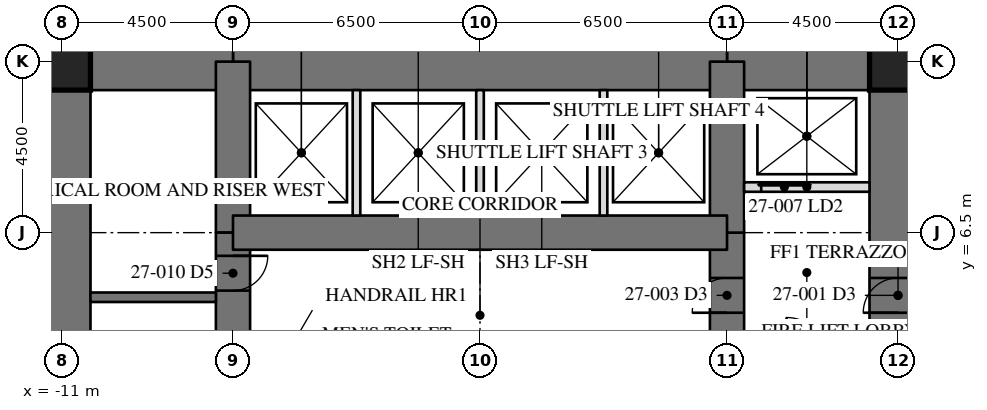
"""IFC4 building model, lengths in metres.
Left out: names, types, materials, properties, quantities, classifications, styles, units other than length and angle.
Written with IfcOpenShell. Run it as: python <this file> out.ifc"""

import sys

from ifc_helpers import new_model, si_unit, direction, frame, frame_2d, origin, origin_2d, place, context, subcontext, project, spatial, rectangle, hollow_rectangle, extrude, element, fill, save


model = new_model("IFC4")
c1 = context("Model", 3, precision=1e-05, world=origin(), true_north=direction((0.0, 1.0)))
c2 = subcontext(c1, "Body", "Model", "MODEL_VIEW")
j1 = project(units=[si_unit("LENGTHUNIT", "METRE"), si_unit("PLANEANGLEUNIT", "RADIAN")], contexts=[c1])
p1 = place(None, origin())
s1 = spatial("IfcSite", under=j1, at=p1, CompositionType="ELEMENT")
p2 = place(p1, origin())
s2 = spatial("IfcBuilding", under=s1, at=p2, CompositionType="ELEMENT")
p3 = place(p2, frame((0.0, 0.0, 117.2)))
s3 = spatial("IfcBuildingStorey", under=s2, at=p3, CompositionType="ELEMENT", Elevation=117.2)
p4 = place(p3, frame((11.0, -11.0, 0.0), z_axis=(0.0, 0.0, 1.0), x_axis=(0.0, 1.0, 0.0)))
e1 = element("IfcWall", 1, at=p4, inside=s3, PredefinedType="SHEAR", context=c2, shape_type="SweptSolid", body=[
    extrude(rectangle(XDim=22.0, YDim=1.5, at=frame_2d((11.0, 0.0))), origin(), (0.0, 0.0, 1.0), 4.1),
])
p5 = place(p4, frame((15.393, 0.0, 0.0)))
e2 = element("IfcOpeningElement", 2, at=p5, cuts=e1, PredefinedType="OPENING", context=c2, shape_type="SweptSolid", body=[
    extrude(rectangle(XDim=0.915, YDim=2.134, at=frame_2d((0.458, 1.067))), frame((0.0, 0.76, 0.0), z_axis=(0.0, -1.0, 0.0), x_axis=(1.0, 0.0, 0.0)), (0.0, 0.0, 1.0), 1.52),
])
p6 = place(p3, frame((-11.0, 11.0, 0.0), z_axis=(0.0, 0.0, 1.0), x_axis=(0.0, -1.0, 0.0)))
e3 = element("IfcWall", 3, at=p6, inside=s3, PredefinedType="SHEAR", context=c2, shape_type="SweptSolid", body=[
    extrude(rectangle(XDim=22.0, YDim=1.5, at=frame_2d((11.0, 0.0))), origin(), (0.0, 0.0, 1.0), 4.1),
])
p7 = place(p6, frame((15.393, 0.0, 0.0)))
e4 = element("IfcOpeningElement", 4, at=p7, cuts=e3, PredefinedType="OPENING", context=c2, shape_type="SweptSolid", body=[
    extrude(rectangle(XDim=0.915, YDim=2.134, at=frame_2d((0.458, 1.067))), frame((0.0, 0.76, 0.0), z_axis=(0.0, -1.0, 0.0), x_axis=(1.0, 0.0, 0.0)), (0.0, 0.0, 1.0), 1.52),
])
p8 = place(p3, frame((11.0, 11.0, 0.0), z_axis=(0.0, 0.0, 1.0), x_axis=(-1.0, 0.0, 0.0)))
e5 = element("IfcWall", 5, at=p8, inside=s3, PredefinedType="SHEAR", context=c2, shape_type="SweptSolid", body=[
    extrude(rectangle(XDim=4.5, YDim=1.5, at=frame_2d((2.25, 0.0))), origin(), (0.0, 0.0, 1.0), 4.1),
])
p9 = place(p3, frame((6.5, 11.0, 0.0), z_axis=(0.0, 0.0, 1.0), x_axis=(-1.0, 0.0, 0.0)))
e6 = element("IfcWall", 6, at=p9, inside=s3, PredefinedType="SHEAR", context=c2, shape_type="SweptSolid", body=[
    extrude(rectangle(XDim=13.0, YDim=1.5, at=frame_2d((6.5, 0.0))), origin(), (0.0, 0.0, 1.0), 4.1),
])
p10 = place(p3, frame((-6.5, 11.0, 0.0), z_axis=(0.0, 0.0, 1.0), x_axis=(-1.0, 0.0, 0.0)))
e7 = element("IfcWall", 7, at=p10, inside=s3, PredefinedType="SHEAR", context=c2, shape_type="SweptSolid", body=[
    extrude(rectangle(XDim=4.5, YDim=1.5, at=frame_2d((2.25, 0.0))), origin(), (0.0, 0.0, 1.0), 4.1),
])
p11 = place(p3, frame((6.5, -6.5, 0.0), z_axis=(0.0, 0.0, 1.0), x_axis=(0.0, 1.0, 0.0)))
e8 = element("IfcWall", 8, at=p11, inside=s3, PredefinedType="SHEAR", context=c2, shape_type="SweptSolid", body=[
    extrude(rectangle(XDim=13.0, YDim=0.9, at=frame_2d((6.5, 0.0))), origin(), (0.0, 0.0, 1.0), 4.1),
])
p12 = place(p11, frame((10.893, 0.0, 0.0)))
e9 = element("IfcOpeningElement", 9, at=p12, cuts=e8, PredefinedType="OPENING", context=c2, shape_type="SweptSolid", body=[
    extrude(rectangle(XDim=0.915, YDim=2.134, at=frame_2d((0.458, 1.067))), frame((0.0, 0.46, 0.0), z_axis=(0.0, -1.0, 0.0), x_axis=(1.0, 0.0, 0.0)), (0.0, 0.0, 1.0), 0.92),
])
p13 = place(p11, frame((0.61, 0.0, 0.0)))
e10 = element("IfcOpeningElement", 10, at=p13, cuts=e8, PredefinedType="OPENING", context=c2, shape_type="SweptSolid", body=[
    extrude(rectangle(XDim=0.915, YDim=2.134, at=frame_2d((0.458, 1.067))), frame((0.0, 0.46, 0.0), z_axis=(0.0, -1.0, 0.0), x_axis=(1.0, 0.0, 0.0)), (0.0, 0.0, 1.0), 0.92),
])
for number, where, z_axis, x_axis in (
    (11, (6.5, 6.5, 0.0), (0.0, 0.0, 1.0), (0.0, 1.0, 0.0)),
    (12, (-6.5, 11.0, 0.0), (0.0, 0.0, 1.0), (0.0, -1.0, 0.0)),
):
    element("IfcWall", number, at=place(p3, frame(where, z_axis=z_axis, x_axis=x_axis)), inside=s3, PredefinedType="SHEAR", context=c2, shape_type="SweptSolid", body=[
        extrude(rectangle(XDim=4.5, YDim=0.9, at=frame_2d((2.25, 0.0))), origin(), (0.0, 0.0, 1.0), 4.1),
    ])
p14 = place(p3, frame((-6.5, 6.5, 0.0), z_axis=(0.0, 0.0, 1.0), x_axis=(0.0, -1.0, 0.0)))
e13 = element("IfcWall", 13, at=p14, inside=s3, PredefinedType="SHEAR", context=c2, shape_type="SweptSolid", body=[
    extrude(rectangle(XDim=13.0, YDim=0.9, at=frame_2d((6.5, 0.0))), origin(), (0.0, 0.0, 1.0), 4.1),
])
p15 = place(p14, frame((10.893, 0.0, 0.0)))
e14 = element("IfcOpeningElement", 14, at=p15, cuts=e13, PredefinedType="OPENING", context=c2, shape_type="SweptSolid", body=[
    extrude(rectangle(XDim=0.915, YDim=2.134, at=frame_2d((0.458, 1.067))), frame((0.0, 0.46, 0.0), z_axis=(0.0, -1.0, 0.0), x_axis=(1.0, 0.0, 0.0)), (0.0, 0.0, 1.0), 0.92),
])
p16 = place(p14, frame((0.61, 0.0, 0.0)))
e15 = element("IfcOpeningElement", 15, at=p16, cuts=e13, PredefinedType="OPENING", context=c2, shape_type="SweptSolid", body=[
    extrude(rectangle(XDim=0.915, YDim=2.134, at=frame_2d((0.458, 1.067))), frame((0.0, 0.46, 0.0), z_axis=(0.0, -1.0, 0.0), x_axis=(1.0, 0.0, 0.0)), (0.0, 0.0, 1.0), 0.92),
])
p17 = place(p3, frame((6.5, 6.5, 0.0), z_axis=(0.0, 0.0, 1.0), x_axis=(-1.0, 0.0, 0.0)))
e16 = element("IfcWall", 16, at=p17, inside=s3, PredefinedType="SHEAR", context=c2, shape_type="SweptSolid", body=[
    extrude(rectangle(XDim=13.0, YDim=0.9, at=frame_2d((6.5, 0.0))), origin(), (0.0, 0.0, 1.0), 4.1),
])
for number, where, z_axis, x_axis in (
    (17, (11.0, 11.0, 0.0), (0.0, 0.0, 1.0), (1.0, 0.0, 0.0)),
    (18, (-11.0, 11.0, 0.0), (0.0, 0.0, 1.0), (1.0, 0.0, 0.0)),
):
    element("IfcColumn", number, at=place(p3, frame(where, z_axis=z_axis, x_axis=x_axis)), inside=s3, PredefinedType="COLUMN", context=c2, shape_type="SweptSolid", body=[
        extrude(hollow_rectangle(XDim=1.499, YDim=1.499, WallThickness=0.102, at=origin_2d()), origin(), (0.0, 0.0, 1.0), 4.1),
    ])
p18 = place(p3, frame((-6.95, 4.8, 0.0), z_axis=(0.0, 0.0, 1.0), x_axis=(-1.0, 0.0, 0.0)))
e19 = element("IfcWall", 19, at=p18, inside=s3, PredefinedType="SOLIDWALL", context=c2, shape_type="SweptSolid", body=[
    extrude(rectangle(XDim=3.3, YDim=0.25, at=frame_2d((1.65, 0.0))), origin(), (0.0, 0.0, 1.0), 3.91),
])
p19 = place(p3, frame((6.95, 7.7, 0.0), z_axis=(0.0, 0.0, 1.0), x_axis=(1.0, 0.0, 0.0)))
e20 = element("IfcWall", 20, at=p19, inside=s3, PredefinedType="PARTITIONING", context=c2, shape_type="SweptSolid", body=[
    extrude(rectangle(XDim=3.3, YDim=0.25, at=frame_2d((1.65, 0.0))), origin(), (0.0, 0.0, 1.0), 3.91),
])
p20 = place(p19, frame((0.45, 0.0, 0.0)))
e21 = element("IfcOpeningElement", 21, at=p20, cuts=e20, PredefinedType="OPENING", context=c2, shape_type="SweptSolid", body=[
    extrude(rectangle(XDim=1.219, YDim=2.134, at=frame_2d((0.609, 1.067))), frame((0.0, 0.135, 0.0), z_axis=(0.0, -1.0, 0.0), x_axis=(1.0, 0.0, 0.0)), (0.0, 0.0, 1.0), 0.27),
])
for number, where, z_axis, x_axis in (
    (22, (-3.25, 6.95, 0.0), (0.0, 0.0, 1.0), (0.0, 1.0, 0.0)),
    (23, (0.0, 6.95, 0.0), (0.0, 0.0, 1.0), (0.0, 1.0, 0.0)),
    (24, (3.25, 6.95, 0.0), (0.0, 0.0, 1.0), (0.0, 1.0, 0.0)),
):
    element("IfcWall", number, at=place(p3, frame(where, z_axis=z_axis, x_axis=x_axis)), inside=s3, PredefinedType="PARTITIONING", context=c2, shape_type="SweptSolid", body=[
        extrude(rectangle(XDim=3.3, YDim=0.2, at=frame_2d((1.65, 0.0))), origin(), (0.0, 0.0, 1.0), 3.91),
    ])
p21 = place(p12, origin())
e25 = element("IfcDoor", 25, at=p21, inside=s3, OperationType="SINGLE_SWING_RIGHT", PredefinedType="DOOR", context=c2, shape_type="SweptSolid", body=[
    extrude(rectangle(XDim=0.915, YDim=2.134, at=frame_2d((0.458, 1.067))), frame((0.0, -0.375, 0.0), z_axis=(0.0, -1.0, 0.0), x_axis=(1.0, 0.0, 0.0)), (0.0, 0.0, 1.0), 0.05),
])
fill(e9, e25)
p22 = place(p20, origin())
e26 = element("IfcDoor", 26, at=p22, inside=s3, OperationType="SLIDING_TO_LEFT", PredefinedType="DOOR", context=c2, shape_type="SweptSolid", body=[
    extrude(rectangle(XDim=1.219, YDim=2.134, at=frame_2d((0.609, 1.067))), frame((0.0, 0.025, 0.0), z_axis=(0.0, -1.0, 0.0), x_axis=(1.0, 0.0, 0.0)), (0.0, 0.0, 1.0), 0.05),
])
fill(e21, e26)
p23 = place(p16, origin())
e27 = element("IfcDoor", 27, at=p23, inside=s3, OperationType="SINGLE_SWING_RIGHT", PredefinedType="DOOR", context=c2, shape_type="SweptSolid", body=[
    extrude(rectangle(XDim=0.915, YDim=2.134, at=frame_2d((0.458, 1.067))), frame((0.0, -0.375, 0.0), z_axis=(0.0, -1.0, 0.0), x_axis=(1.0, 0.0, 0.0)), (0.0, 0.0, 1.0), 0.05),
])
fill(e15, e27)
save(model, sys.argv[1])
